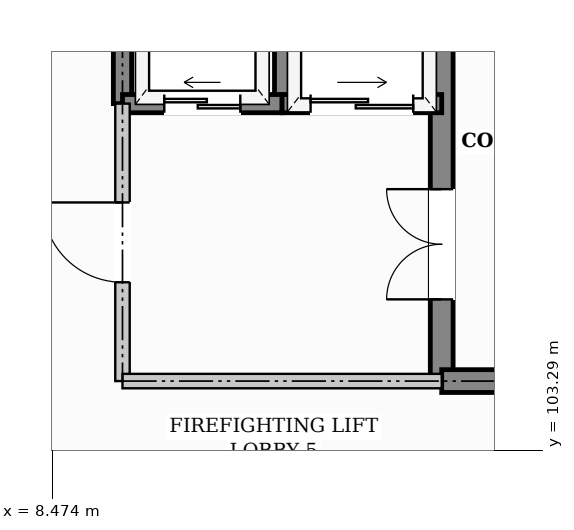
"""IFC4 building model, lengths in metres.
Left out: names, types, materials, properties, quantities, classifications, styles, units other than length and angle.
Written with IfcOpenShell. Run it as: python <this file> out.ifc"""

import sys

from ifc_helpers import new_model, si_unit, direction, frame, frame_2d, origin, place, context, subcontext, project, spatial, rectangle, extrude, element, fill, save


model = new_model("IFC4")
c1 = context("Model", 3, precision=1e-05, world=origin(), true_north=direction((0.0, 1.0)))
c2 = subcontext(c1, "Body", "Model", "MODEL_VIEW")
j1 = project(units=[si_unit("LENGTHUNIT", "METRE"), si_unit("PLANEANGLEUNIT", "RADIAN")], contexts=[c1])
p1 = place(None, origin())
s1 = spatial("IfcSite", under=j1, at=p1, CompositionType="ELEMENT")
p2 = place(p1, origin())
s2 = spatial("IfcBuilding", under=s1, at=p2, CompositionType="ELEMENT")
p3 = place(p2, origin())
s3 = spatial("IfcBuildingStorey", under=s2, at=p3, CompositionType="ELEMENT", Elevation=0.0)
p4 = place(p3, frame((13.6, 104.2, 0.0), z_axis=(0.0, 0.0, 1.0), x_axis=(0.0, 1.0, 0.0)))
e1 = element("IfcWall", 1, at=p4, inside=s3, PredefinedType="SHEAR", context=c2, shape_type="SweptSolid", body=[
    extrude(rectangle(XDim=6.0, YDim=0.3, at=frame_2d((3.0, 0.0))), origin(), (0.0, 0.0, 1.0), 4.82),
])
p5 = place(p4, frame((1.075, 0.0, 0.0)))
e2 = element("IfcOpeningElement", 2, at=p5, cuts=e1, PredefinedType="OPENING", context=c2, shape_type="SweptSolid", body=[
    extrude(rectangle(XDim=1.45, YDim=2.2, at=frame_2d((0.725, 1.1))), frame((0.0, 0.16, 0.0), z_axis=(0.0, -1.0, 0.0), x_axis=(1.0, 0.0, 0.0)), (0.0, 0.0, 1.0), 0.32),
])
p6 = place(p3, frame((13.6, 104.2, 0.0), z_axis=(0.0, 0.0, 1.0), x_axis=(1.0, 0.0, 0.0)))
e3 = element("IfcWall", 3, at=p6, inside=s3, PredefinedType="SHEAR", context=c2, shape_type="SweptSolid", body=[
    extrude(rectangle(XDim=7.0, YDim=0.3, at=frame_2d((3.5, 0.0))), origin(), (0.0, 0.0, 1.0), 4.82),
])
p7 = place(p3, frame((9.4, 107.85, 0.0), z_axis=(0.0, 0.0, 1.0), x_axis=(0.0, 1.0, 0.0)))
e4 = element("IfcWall", 4, at=p7, inside=s3, PredefinedType="SHEAR", context=c2, shape_type="SweptSolid", body=[
    extrude(rectangle(XDim=2.35, YDim=0.24, at=frame_2d((1.175, 0.0))), origin(), (0.0, 0.0, 1.0), 4.82),
])
p8 = place(p3, frame((11.5, 107.85, 0.0), z_axis=(0.0, 0.0, 1.0), x_axis=(0.0, 1.0, 0.0)))
e5 = element("IfcWall", 5, at=p8, inside=s3, PredefinedType="SHEAR", context=c2, shape_type="SweptSolid", body=[
    extrude(rectangle(XDim=2.35, YDim=0.2, at=frame_2d((1.175, 0.0))), origin(), (0.0, 0.0, 1.0), 4.82),
])
p9 = place(p3, frame((9.4, 107.85, 0.0), z_axis=(0.0, 0.0, 1.0), x_axis=(1.0, 0.0, 0.0)))
e6 = element("IfcWall", 6, at=p9, inside=s3, PredefinedType="SHEAR", context=c2, shape_type="SweptSolid", body=[
    extrude(rectangle(XDim=2.1, YDim=0.24, at=frame_2d((1.05, 0.0))), origin(), (0.0, 0.0, 1.0), 4.82),
])
p10 = place(p9, frame((0.55, 0.0, 0.0)))
e7 = element("IfcOpeningElement", 7, at=p10, cuts=e6, PredefinedType="OPENING", context=c2, shape_type="SweptSolid", body=[
    extrude(rectangle(XDim=1.0, YDim=2.1, at=frame_2d((0.5, 1.05))), frame((0.0, 0.13, 0.0), z_axis=(0.0, -1.0, 0.0), x_axis=(1.0, 0.0, 0.0)), (0.0, 0.0, 1.0), 0.26),
])
p11 = place(p3, frame((11.5, 107.85, 0.0), z_axis=(0.0, 0.0, 1.0), x_axis=(1.0, 0.0, 0.0)))
e8 = element("IfcWall", 8, at=p11, inside=s3, PredefinedType="SHEAR", context=c2, shape_type="SweptSolid", body=[
    extrude(rectangle(XDim=2.1, YDim=0.24, at=frame_2d((1.05, 0.0))), origin(), (0.0, 0.0, 1.0), 4.82),
])
p12 = place(p11, frame((0.375, 0.0, 0.0)))
e9 = element("IfcOpeningElement", 9, at=p12, cuts=e8, PredefinedType="OPENING", context=c2, shape_type="SweptSolid", body=[
    extrude(rectangle(XDim=1.35, YDim=2.2, at=frame_2d((0.675, 1.1))), frame((0.0, 0.13, 0.0), z_axis=(0.0, -1.0, 0.0), x_axis=(1.0, 0.0, 0.0)), (0.0, 0.0, 1.0), 0.26),
])
p13 = place(p3, frame((9.4, 104.2, 0.0), z_axis=(0.0, 0.0, 1.0), x_axis=(0.0, 1.0, 0.0)))
e10 = element("IfcWall", 10, at=p13, inside=s3, PredefinedType="PARTITIONING", context=c2, shape_type="SweptSolid", body=[
    extrude(rectangle(XDim=3.65, YDim=0.19, at=frame_2d((1.825, 0.0))), origin(), (0.0, 0.0, 1.0), 4.82),
])
p14 = place(p13, frame((1.3, 0.0, 0.0)))
e11 = element("IfcOpeningElement", 11, at=p14, cuts=e10, PredefinedType="OPENING", context=c2, shape_type="SweptSolid", body=[
    extrude(rectangle(XDim=1.05, YDim=2.15, at=frame_2d((0.525, 1.075))), frame((0.0, 0.105, 0.0), z_axis=(0.0, -1.0, 0.0), x_axis=(1.0, 0.0, 0.0)), (0.0, 0.0, 1.0), 0.21),
])
p15 = place(p3, frame((9.4, 104.2, 0.0), z_axis=(0.0, 0.0, 1.0), x_axis=(1.0, 0.0, 0.0)))
e12 = element("IfcWall", 12, at=p15, inside=s3, PredefinedType="PARTITIONING", context=c2, shape_type="SweptSolid", body=[
    extrude(rectangle(XDim=4.2, YDim=0.19, at=frame_2d((2.1, 0.0))), origin(), (0.0, 0.0, 1.0), 4.82),
])
p16 = place(p5, origin())
e13 = element("IfcDoor", 13, at=p16, inside=s3, OperationType="DOUBLE_DOOR_SINGLE_SWING", PredefinedType="DOOR", context=c2, shape_type="SweptSolid", body=[
    extrude(rectangle(XDim=1.45, YDim=2.2, at=frame_2d((0.725, 1.1))), frame((0.0, 0.025, 0.0), z_axis=(0.0, -1.0, 0.0), x_axis=(1.0, 0.0, 0.0)), (0.0, 0.0, 1.0), 0.05),
])
fill(e2, e13)
p17 = place(p10, origin())
e14 = element("IfcDoor", 14, at=p17, inside=s3, OperationType="SLIDING_TO_LEFT", PredefinedType="DOOR", context=c2, shape_type="SweptSolid", body=[
    extrude(rectangle(XDim=1.0, YDim=2.1, at=frame_2d((0.5, 1.05))), frame((0.0, 0.025, 0.0), z_axis=(0.0, -1.0, 0.0), x_axis=(1.0, 0.0, 0.0)), (0.0, 0.0, 1.0), 0.05),
])
fill(e7, e14)
p18 = place(p12, origin())
e15 = element("IfcDoor", 15, at=p18, inside=s3, OperationType="SLIDING_TO_RIGHT", PredefinedType="DOOR", context=c2, shape_type="SweptSolid", body=[
    extrude(rectangle(XDim=1.35, YDim=2.2, at=frame_2d((0.675, 1.1))), frame((0.0, 0.025, 0.0), z_axis=(0.0, -1.0, 0.0), x_axis=(1.0, 0.0, 0.0)), (0.0, 0.0, 1.0), 0.05),
])
fill(e9, e15)
p19 = place(p14, origin())
e16 = element("IfcDoor", 16, at=p19, inside=s3, OperationType="SINGLE_SWING_RIGHT", PredefinedType="DOOR", context=c2, shape_type="SweptSolid", body=[
    extrude(rectangle(XDim=1.05, YDim=2.15, at=frame_2d((0.525, 1.075))), frame((0.0, 0.025, 0.0), z_axis=(0.0, -1.0, 0.0), x_axis=(1.0, 0.0, 0.0)), (0.0, 0.0, 1.0), 0.05),
])
fill(e11, e16)
save(model, sys.argv[1])
